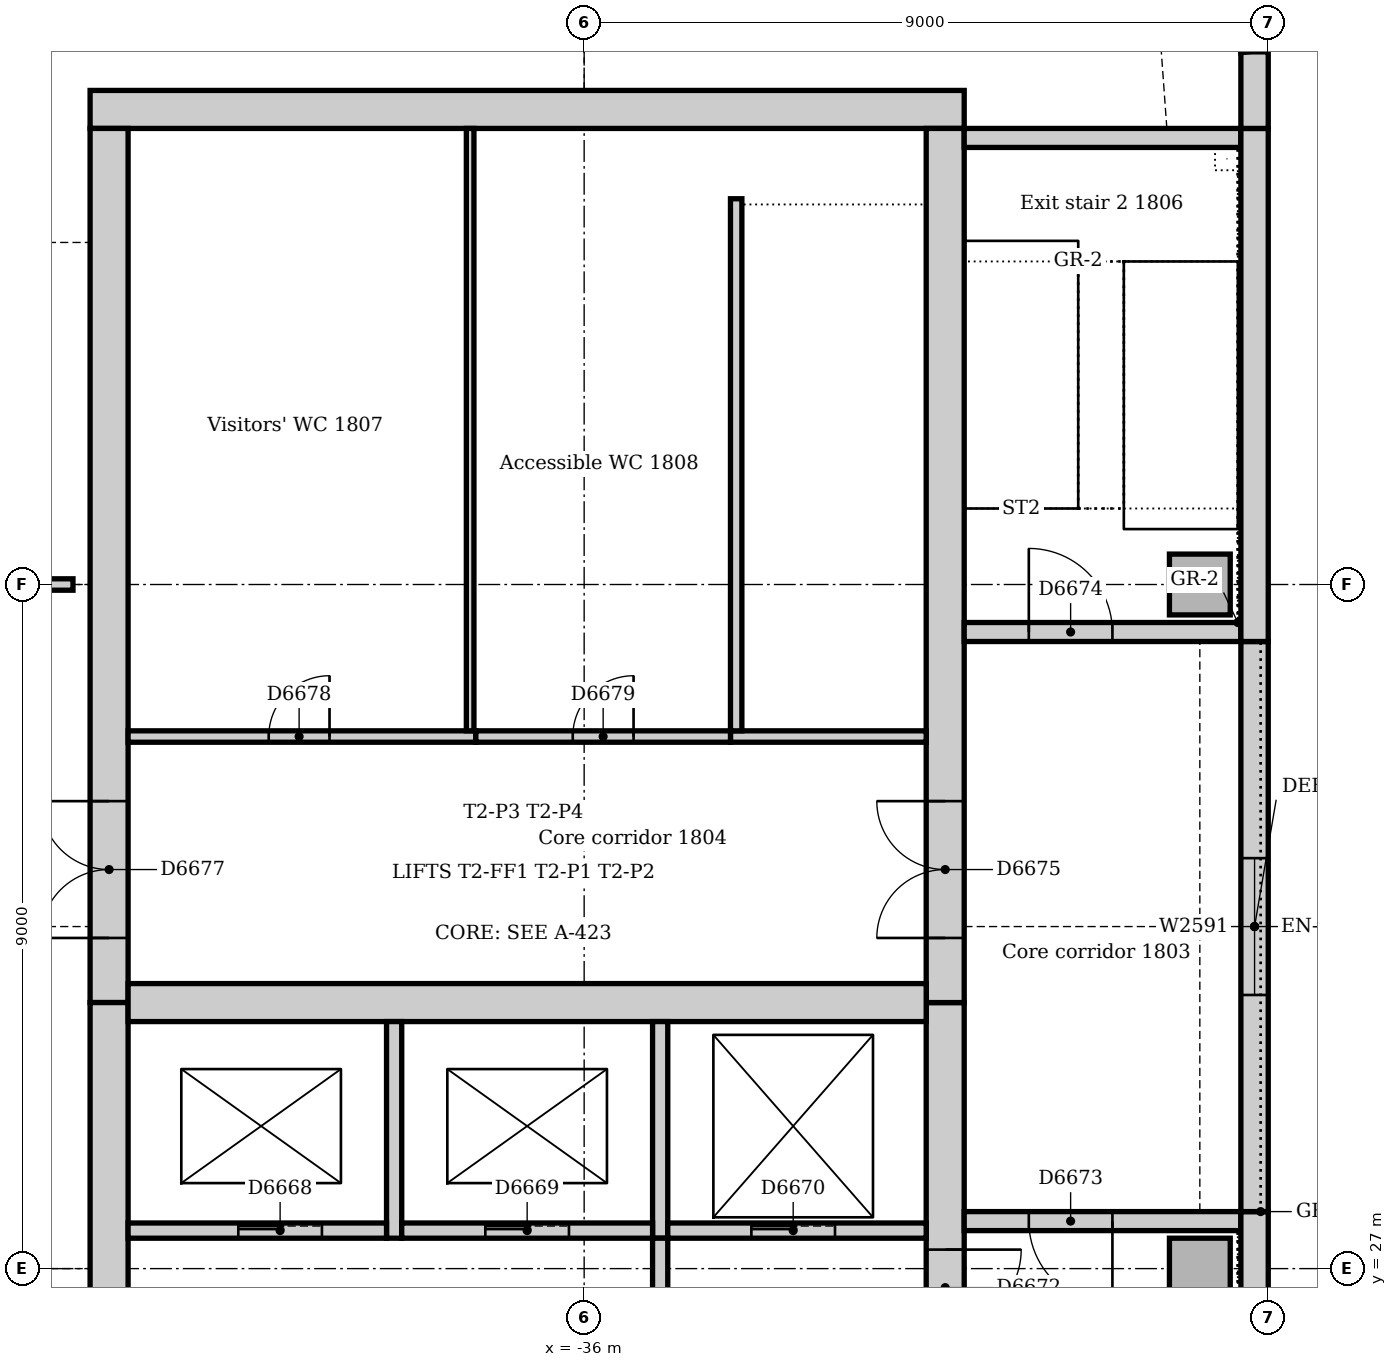
"""IFC4 building model, lengths in metres.
Left out: names, types, materials, properties, quantities, classifications, styles, units other than length and angle.
Written with IfcOpenShell. Run it as: python <this file> out.ifc"""

import sys

from ifc_helpers import new_model, si_unit, direction, frame, frame_2d, origin, origin_2d, place, context, subcontext, project, spatial, rectangle, extrude, element, fill, save


model = new_model("IFC4")
c1 = context("Model", 3, precision=1e-05, world=origin(), true_north=direction((0.0, 1.0)))
c2 = subcontext(c1, "Body", "Model", "MODEL_VIEW")
j1 = project(units=[si_unit("LENGTHUNIT", "METRE"), si_unit("PLANEANGLEUNIT", "RADIAN")], contexts=[c1])
p1 = place(None, origin())
s1 = spatial("IfcSite", under=j1, at=p1, CompositionType="ELEMENT")
p2 = place(p1, origin())
s2 = spatial("IfcBuilding", under=s1, at=p2, CompositionType="ELEMENT")
p3 = place(p2, frame((0.0, 0.0, 79.0)))
s3 = spatial("IfcBuildingStorey", under=s2, at=p3, CompositionType="ELEMENT", Elevation=79.0)
p4 = place(p3, frame((-31.0, 42.25, 0.0), z_axis=(0.0, 0.0, 1.0), x_axis=(-1.0, 0.0, 0.0)))
e1 = element("IfcWall", 1, at=p4, inside=s3, PredefinedType="SOLIDWALL", context=c2, shape_type="SweptSolid", body=[
    extrude(rectangle(XDim=11.5, YDim=0.5, at=frame_2d((5.75, 0.0))), origin(), (0.0, 0.0, 1.0), 4.0),
])
p5 = place(p3, frame((-31.25, 21.0, 0.0), z_axis=(0.0, 0.0, 1.0), x_axis=(0.0, 1.0, 0.0)))
e2 = element("IfcWall", 2, at=p5, inside=s3, PredefinedType="SOLIDWALL", context=c2, shape_type="SweptSolid", body=[
    extrude(rectangle(XDim=9.5, YDim=0.5, at=frame_2d((4.75, 0.0))), origin(), (0.0, 0.0, 1.0), 4.0),
])
p6 = place(p5, frame((5.25, 0.0, 0.0)))
e3 = element("IfcOpeningElement", 3, at=p6, cuts=e2, PredefinedType="OPENING", context=c2, shape_type="SweptSolid", body=[
    extrude(rectangle(XDim=1.0, YDim=2.1, at=frame_2d((0.5, 1.05))), frame((0.0, 0.26, 0.0), z_axis=(0.0, -1.0, 0.0), x_axis=(1.0, 0.0, 0.0)), (0.0, 0.0, 1.0), 0.52),
])
p7 = place(p3, frame((-31.25, 30.5, 0.0), z_axis=(0.0, 0.0, 1.0), x_axis=(0.0, 1.0, 0.0)))
e4 = element("IfcWall", 4, at=p7, inside=s3, PredefinedType="SOLIDWALL", context=c2, shape_type="SweptSolid", body=[
    extrude(rectangle(XDim=11.5, YDim=0.5, at=frame_2d((5.75, 0.0))), origin(), (0.0, 0.0, 1.0), 4.0),
])
p8 = place(p7, frame((0.85, 0.0, 0.0)))
e5 = element("IfcOpeningElement", 5, at=p8, cuts=e4, PredefinedType="OPENING", context=c2, shape_type="SweptSolid", body=[
    extrude(rectangle(XDim=1.8, YDim=2.1, at=frame_2d((0.9, 1.05))), frame((0.0, 0.26, 0.0), z_axis=(0.0, -1.0, 0.0), x_axis=(1.0, 0.0, 0.0)), (0.0, 0.0, 1.0), 0.52),
])
p9 = place(p3, frame((-42.25, 42.0, 0.0), z_axis=(0.0, 0.0, 1.0), x_axis=(0.0, -1.0, 0.0)))
e6 = element("IfcWall", 6, at=p9, inside=s3, PredefinedType="SOLIDWALL", context=c2, shape_type="SweptSolid", body=[
    extrude(rectangle(XDim=11.5, YDim=0.5, at=frame_2d((5.75, 0.0))), origin(), (0.0, 0.0, 1.0), 4.0),
])
p10 = place(p9, frame((8.85, 0.0, 0.0)))
e7 = element("IfcOpeningElement", 7, at=p10, cuts=e6, PredefinedType="OPENING", context=c2, shape_type="SweptSolid", body=[
    extrude(rectangle(XDim=1.8, YDim=2.1, at=frame_2d((0.9, 1.05))), frame((0.0, 0.26, 0.0), z_axis=(0.0, -1.0, 0.0), x_axis=(1.0, 0.0, 0.0)), (0.0, 0.0, 1.0), 0.52),
])
p11 = place(p3, frame((-42.25, 30.5, 0.0), z_axis=(0.0, 0.0, 1.0), x_axis=(0.0, -1.0, 0.0)))
e8 = element("IfcWall", 8, at=p11, inside=s3, PredefinedType="SOLIDWALL", context=c2, shape_type="SweptSolid", body=[
    extrude(rectangle(XDim=9.5, YDim=0.5, at=frame_2d((4.75, 0.0))), origin(), (0.0, 0.0, 1.0), 4.0),
])
p12 = place(p11, frame((3.85, 0.0, 0.0)))
e9 = element("IfcOpeningElement", 9, at=p12, cuts=e8, PredefinedType="OPENING", context=c2, shape_type="SweptSolid", body=[
    extrude(rectangle(XDim=1.8, YDim=2.1, at=frame_2d((0.9, 1.05))), frame((0.0, 0.26, 0.0), z_axis=(0.0, -1.0, 0.0), x_axis=(1.0, 0.0, 0.0)), (0.0, 0.0, 1.0), 0.52),
])
p13 = place(p3, frame((-42.0, 30.5, 0.0), z_axis=(0.0, 0.0, 1.0), x_axis=(1.0, 0.0, 0.0)))
e10 = element("IfcWall", 10, at=p13, inside=s3, PredefinedType="SOLIDWALL", context=c2, shape_type="SweptSolid", body=[
    extrude(rectangle(XDim=10.5, YDim=0.5, at=frame_2d((5.25, 0.0))), origin(), (0.0, 0.0, 1.0), 4.0),
])
p14 = place(p3, frame((-27.36, 27.625, 0.0), z_axis=(0.0, 0.0, 1.0), x_axis=(-1.0, 0.0, 0.0)))
e11 = element("IfcWall", 11, at=p14, inside=s3, PredefinedType="SOLIDWALL", context=c2, shape_type="SweptSolid", body=[
    extrude(rectangle(XDim=3.64, YDim=0.25, at=frame_2d((1.82, 0.0))), origin(), (0.0, 0.0, 1.0), 4.0),
])
p15 = place(p14, frame((1.69, 0.0, 0.0)))
e12 = element("IfcOpeningElement", 12, at=p15, cuts=e11, PredefinedType="OPENING", context=c2, shape_type="SweptSolid", body=[
    extrude(rectangle(XDim=1.1, YDim=2.1, at=frame_2d((0.55, 1.05))), frame((0.0, 0.135, 0.0), z_axis=(0.0, -1.0, 0.0), x_axis=(1.0, 0.0, 0.0)), (0.0, 0.0, 1.0), 0.27),
])
p16 = place(p3, frame((-31.0, 35.375, 0.0), z_axis=(0.0, 0.0, 1.0), x_axis=(1.0, 0.0, 0.0)))
e13 = element("IfcWall", 13, at=p16, inside=s3, PredefinedType="SOLIDWALL", context=c2, shape_type="SweptSolid", body=[
    extrude(rectangle(XDim=3.64, YDim=0.25, at=frame_2d((1.82, 0.0))), origin(), (0.0, 0.0, 1.0), 4.0),
])
p17 = place(p16, frame((0.85, 0.0, 0.0)))
e14 = element("IfcOpeningElement", 14, at=p17, cuts=e13, PredefinedType="OPENING", context=c2, shape_type="SweptSolid", body=[
    extrude(rectangle(XDim=1.1, YDim=2.1, at=frame_2d((0.55, 1.05))), frame((0.0, 0.135, 0.0), z_axis=(0.0, -1.0, 0.0), x_axis=(1.0, 0.0, 0.0)), (0.0, 0.0, 1.0), 0.27),
])
p18 = place(p3, frame((-27.36, 41.875, 0.0), z_axis=(0.0, 0.0, 1.0), x_axis=(-1.0, 0.0, 0.0)))
e15 = element("IfcWall", 15, at=p18, inside=s3, PredefinedType="SOLIDWALL", context=c2, shape_type="SweptSolid", body=[
    extrude(rectangle(XDim=3.64, YDim=0.25, at=frame_2d((1.82, 0.0))), origin(), (0.0, 0.0, 1.0), 4.0),
])
for number, where, z_axis, x_axis in (
    (16, (-27.9, 27.0, 0.0), (0.0, 0.0, 1.0), (1.0, 0.0, 0.0)),
    (17, (-27.9, 36.0, 0.0), (0.0, 0.0, 1.0), (1.0, 0.0, 0.0)),
):
    element("IfcColumn", number, at=place(p3, frame(where, z_axis=z_axis, x_axis=x_axis)), inside=s3, PredefinedType="COLUMN", context=c2, shape_type="SweptSolid", body=[
        extrude(rectangle(XDim=0.8, YDim=0.8, at=origin_2d()), origin(), (0.0, 0.0, 1.0), 4.0),
    ])
p19 = place(p3, frame((-27.18, 21.0, 0.0), z_axis=(0.0, 0.0, 1.0), x_axis=(0.0, 1.0, 0.0)))
e18 = element("IfcWall", 18, at=p19, inside=s3, PredefinedType="STANDARD", context=c2, shape_type="SweptSolid", body=[
    extrude(rectangle(XDim=6.75, YDim=0.36, at=frame_2d((3.375, 0.0))), origin(), (0.0, 0.0, 1.0), 3.85),
])
p20 = place(p3, frame((-27.18, 27.75, 0.0), z_axis=(0.0, 0.0, 1.0), x_axis=(0.0, 1.0, 0.0)))
e19 = element("IfcWall", 19, at=p20, inside=s3, PredefinedType="STANDARD", context=c2, shape_type="SweptSolid", body=[
    extrude(rectangle(XDim=7.5, YDim=0.36, at=frame_2d((3.75, 0.0))), origin(), (0.0, 0.0, 1.0), 3.85),
])
p21 = place(p20, frame((2.85, 0.0, 1.2)))
e20 = element("IfcOpeningElement", 20, at=p21, cuts=e19, PredefinedType="OPENING", context=c2, shape_type="SweptSolid", body=[
    extrude(rectangle(XDim=1.8, YDim=1.2, at=frame_2d((0.9, 0.6))), frame((0.0, 0.19, 0.0), z_axis=(0.0, -1.0, 0.0), x_axis=(1.0, 0.0, 0.0)), (0.0, 0.0, 1.0), 0.38),
])
p22 = place(p3, frame((-27.18, 35.25, 0.0), z_axis=(0.0, 0.0, 1.0), x_axis=(0.0, 1.0, 0.0)))
e21 = element("IfcWall", 21, at=p22, inside=s3, PredefinedType="STANDARD", context=c2, shape_type="SweptSolid", body=[
    extrude(rectangle(XDim=6.75, YDim=0.36, at=frame_2d((3.375, 0.0))), origin(), (0.0, 0.0, 1.0), 3.85),
])
p23 = place(p3, frame((-27.18, 42.0, 0.0), z_axis=(0.0, 0.0, 1.0), x_axis=(0.0, 1.0, 0.0)))
e22 = element("IfcWall", 22, at=p23, inside=s3, PredefinedType="STANDARD", context=c2, shape_type="SweptSolid", body=[
    extrude(rectangle(XDim=1.007, YDim=0.36, at=frame_2d((0.504, 0.0))), origin(), (0.0, 0.0, 1.0), 3.85),
])
p24 = place(p3, frame((-27.183, 43.019, 0.0), z_axis=(0.0, 0.0, 1.0), x_axis=(-0.13055608231, 0.99144092581, 0.0)))
e23 = element("IfcWall", 23, at=p24, inside=s3, PredefinedType="STANDARD", context=c2, shape_type="SweptSolid", body=[
    extrude(rectangle(XDim=0.713, YDim=0.36, at=frame_2d((0.356, 0.0))), origin(), (0.0, 0.0, 1.0), 3.85),
])
p25 = place(p3, frame((-38.5, 27.4, 0.0), z_axis=(0.0, 0.0, 1.0), x_axis=(0.0, 1.0, 0.0)))
e24 = element("IfcWall", 24, at=p25, inside=s3, PredefinedType="SOLIDWALL", context=c2, shape_type="SweptSolid", body=[
    extrude(rectangle(XDim=2.85, YDim=0.2, at=frame_2d((1.425, 0.0))), origin(), (0.0, 0.0, 1.0), 4.0),
])
p26 = place(p3, frame((-42.0, 27.5, 0.0), z_axis=(0.0, 0.0, 1.0), x_axis=(1.0, 0.0, 0.0)))
e25 = element("IfcWall", 25, at=p26, inside=s3, PredefinedType="SOLIDWALL", context=c2, shape_type="SweptSolid", body=[
    extrude(rectangle(XDim=3.4, YDim=0.2, at=frame_2d((1.7, 0.0))), origin(), (0.0, 0.0, 1.0), 4.0),
])
p27 = place(p26, frame((1.45, 0.0, 0.0)))
e26 = element("IfcOpeningElement", 26, at=p27, cuts=e25, PredefinedType="OPENING", context=c2, shape_type="SweptSolid", body=[
    extrude(rectangle(XDim=1.1, YDim=2.1, at=frame_2d((0.55, 1.05))), frame((0.0, 0.11, 0.0), z_axis=(0.0, -1.0, 0.0), x_axis=(1.0, 0.0, 0.0)), (0.0, 0.0, 1.0), 0.22),
])
p28 = place(p3, frame((-35.0, 27.4, 0.0), z_axis=(0.0, 0.0, 1.0), x_axis=(0.0, 1.0, 0.0)))
e27 = element("IfcWall", 27, at=p28, inside=s3, PredefinedType="SOLIDWALL", context=c2, shape_type="SweptSolid", body=[
    extrude(rectangle(XDim=2.85, YDim=0.2, at=frame_2d((1.425, 0.0))), origin(), (0.0, 0.0, 1.0), 4.0),
])
p29 = place(p3, frame((-38.4, 27.5, 0.0), z_axis=(0.0, 0.0, 1.0), x_axis=(1.0, 0.0, 0.0)))
e28 = element("IfcWall", 28, at=p29, inside=s3, PredefinedType="SOLIDWALL", context=c2, shape_type="SweptSolid", body=[
    extrude(rectangle(XDim=3.3, YDim=0.2, at=frame_2d((1.65, 0.0))), origin(), (0.0, 0.0, 1.0), 4.0),
])
p30 = place(p29, frame((1.1, 0.0, 0.0)))
e29 = element("IfcOpeningElement", 29, at=p30, cuts=e28, PredefinedType="OPENING", context=c2, shape_type="SweptSolid", body=[
    extrude(rectangle(XDim=1.1, YDim=2.1, at=frame_2d((0.55, 1.05))), frame((0.0, 0.11, 0.0), z_axis=(0.0, -1.0, 0.0), x_axis=(1.0, 0.0, 0.0)), (0.0, 0.0, 1.0), 0.22),
])
p31 = place(p3, frame((-34.9, 27.5, 0.0), z_axis=(0.0, 0.0, 1.0), x_axis=(1.0, 0.0, 0.0)))
e30 = element("IfcWall", 30, at=p31, inside=s3, PredefinedType="SOLIDWALL", context=c2, shape_type="SweptSolid", body=[
    extrude(rectangle(XDim=3.4, YDim=0.2, at=frame_2d((1.7, 0.0))), origin(), (0.0, 0.0, 1.0), 4.0),
])
p32 = place(p31, frame((1.1, 0.0, 0.0)))
e31 = element("IfcOpeningElement", 31, at=p32, cuts=e30, PredefinedType="OPENING", context=c2, shape_type="SweptSolid", body=[
    extrude(rectangle(XDim=1.1, YDim=2.1, at=frame_2d((0.55, 1.05))), frame((0.0, 0.11, 0.0), z_axis=(0.0, -1.0, 0.0), x_axis=(1.0, 0.0, 0.0)), (0.0, 0.0, 1.0), 0.22),
])
p33 = place(p3, frame((-35.0, 24.1, 0.0), z_axis=(0.0, 0.0, 1.0), x_axis=(0.0, 1.0, 0.0)))
e32 = element("IfcWall", 32, at=p33, inside=s3, PredefinedType="SOLIDWALL", context=c2, shape_type="SweptSolid", body=[
    extrude(rectangle(XDim=3.3, YDim=0.2, at=frame_2d((1.65, 0.0))), origin(), (0.0, 0.0, 1.0), 4.0),
])
p34 = place(p33, frame((1.15, 0.0, 0.0)))
e33 = element("IfcOpeningElement", 33, at=p34, cuts=e32, PredefinedType="OPENING", context=c2, shape_type="SweptSolid", body=[
    extrude(rectangle(XDim=1.0, YDim=2.1, at=frame_2d((0.5, 1.05))), frame((0.0, 0.11, 0.0), z_axis=(0.0, -1.0, 0.0), x_axis=(1.0, 0.0, 0.0)), (0.0, 0.0, 1.0), 0.22),
])
p35 = place(p3, frame((-34.075, 34.0, 0.0), z_axis=(0.0, 0.0, 1.0), x_axis=(1.0, 0.0, 0.0)))
e34 = element("IfcWall", 34, at=p35, inside=s3, PredefinedType="SOLIDWALL", context=c2, shape_type="SweptSolid", body=[
    extrude(rectangle(XDim=2.575, YDim=0.15, at=frame_2d((1.288, 0.0))), origin(), (0.0, 0.0, 1.0), 4.0),
])
p36 = place(p3, frame((-34.0, 41.075, 0.0), z_axis=(0.0, 0.0, 1.0), x_axis=(0.0, -1.0, 0.0)))
e35 = element("IfcWall", 35, at=p36, inside=s3, PredefinedType="SOLIDWALL", context=c2, shape_type="SweptSolid", body=[
    extrude(rectangle(XDim=7.0, YDim=0.15, at=frame_2d((3.5, 0.0))), origin(), (0.0, 0.0, 1.0), 4.0),
])
p37 = place(p3, frame((-37.425, 34.0, 0.0), z_axis=(0.0, 0.0, 1.0), x_axis=(-1.0, 0.0, 0.0)))
e36 = element("IfcWall", 36, at=p37, inside=s3, PredefinedType="PARTITIONING", context=c2, shape_type="SweptSolid", body=[
    extrude(rectangle(XDim=4.575, YDim=0.15, at=frame_2d((2.288, 0.0))), origin(), (0.0, 0.0, 1.0), 3.85),
])
p38 = place(p37, frame((1.925, 0.0, 0.0)))
e37 = element("IfcOpeningElement", 37, at=p38, cuts=e36, PredefinedType="OPENING", context=c2, shape_type="SweptSolid", body=[
    extrude(rectangle(XDim=0.8, YDim=2.1, at=frame_2d((0.4, 1.05))), frame((0.0, 0.085, 0.0), z_axis=(0.0, -1.0, 0.0), x_axis=(1.0, 0.0, 0.0)), (0.0, 0.0, 1.0), 0.17),
])
p39 = place(p3, frame((-34.075, 34.0, 0.0), z_axis=(0.0, 0.0, 1.0), x_axis=(-1.0, 0.0, 0.0)))
e38 = element("IfcWall", 38, at=p39, inside=s3, PredefinedType="PARTITIONING", context=c2, shape_type="SweptSolid", body=[
    extrude(rectangle(XDim=3.35, YDim=0.15, at=frame_2d((1.675, 0.0))), origin(), (0.0, 0.0, 1.0), 3.85),
])
p40 = place(p39, frame((1.275, 0.0, 0.0)))
e39 = element("IfcOpeningElement", 39, at=p40, cuts=e38, PredefinedType="OPENING", context=c2, shape_type="SweptSolid", body=[
    extrude(rectangle(XDim=0.8, YDim=2.1, at=frame_2d((0.4, 1.05))), frame((0.0, 0.085, 0.0), z_axis=(0.0, -1.0, 0.0), x_axis=(1.0, 0.0, 0.0)), (0.0, 0.0, 1.0), 0.17),
])
p41 = place(p3, frame((-37.5, 34.075, 0.0), z_axis=(0.0, 0.0, 1.0), x_axis=(0.0, 1.0, 0.0)))
e40 = element("IfcWall", 40, at=p41, inside=s3, PredefinedType="PARTITIONING", context=c2, shape_type="SweptSolid", body=[
    extrude(rectangle(XDim=7.925, YDim=0.1, at=frame_2d((3.962, 0.0))), origin(), (0.0, 0.0, 1.0), 3.85),
])
p42 = place(p3, frame((-44.65, 36.0, 0.0), z_axis=(0.0, 0.0, 1.0), x_axis=(1.0, 0.0, 0.0)))
e41 = element("IfcWall", 41, at=p42, inside=s3, PredefinedType="PARTITIONING", context=c2, shape_type="SweptSolid", body=[
    extrude(rectangle(XDim=1.925, YDim=0.15, at=frame_2d((0.963, 0.0))), origin(), (0.0, 0.0, 1.0), 3.602),
])
p43 = place(p42, frame((0.5, 0.0, 0.0)))
e42 = element("IfcOpeningElement", 42, at=p43, cuts=e41, PredefinedType="OPENING", context=c2, shape_type="SweptSolid", body=[
    extrude(rectangle(XDim=0.9, YDim=2.1, at=frame_2d((0.45, 1.05))), frame((0.0, 0.085, 0.0), z_axis=(0.0, -1.0, 0.0), x_axis=(1.0, 0.0, 0.0)), (0.0, 0.0, 1.0), 0.17),
])
p44 = place(p21, origin())
e43 = element("IfcWindow", 43, at=p44, inside=s3, PartitioningType="SINGLE_PANEL", PredefinedType="WINDOW", context=c2, shape_type="SweptSolid", body=[
    extrude(rectangle(XDim=1.8, YDim=1.2, at=frame_2d((0.9, 0.6))), frame((0.0, 0.13, 0.0), z_axis=(0.0, -1.0, 0.0), x_axis=(1.0, 0.0, 0.0)), (0.0, 0.0, 1.0), 0.06),
])
fill(e20, e43)
p45 = place(p27, origin())
e44 = element("IfcDoor", 44, at=p45, inside=s3, OperationType="SLIDING_TO_LEFT", PredefinedType="DOOR", context=c2, shape_type="SweptSolid", body=[
    extrude(rectangle(XDim=1.1, YDim=2.1, at=frame_2d((0.55, 1.05))), frame((0.0, 0.025, 0.0), z_axis=(0.0, -1.0, 0.0), x_axis=(1.0, 0.0, 0.0)), (0.0, 0.0, 1.0), 0.05),
])
fill(e26, e44)
p46 = place(p30, origin())
e45 = element("IfcDoor", 45, at=p46, inside=s3, OperationType="SLIDING_TO_LEFT", PredefinedType="DOOR", context=c2, shape_type="SweptSolid", body=[
    extrude(rectangle(XDim=1.1, YDim=2.1, at=frame_2d((0.55, 1.05))), frame((0.0, 0.025, 0.0), z_axis=(0.0, -1.0, 0.0), x_axis=(1.0, 0.0, 0.0)), (0.0, 0.0, 1.0), 0.05),
])
fill(e29, e45)
p47 = place(p32, origin())
e46 = element("IfcDoor", 46, at=p47, inside=s3, OperationType="SLIDING_TO_LEFT", PredefinedType="DOOR", context=c2, shape_type="SweptSolid", body=[
    extrude(rectangle(XDim=1.1, YDim=2.1, at=frame_2d((0.55, 1.05))), frame((0.0, 0.025, 0.0), z_axis=(0.0, -1.0, 0.0), x_axis=(1.0, 0.0, 0.0)), (0.0, 0.0, 1.0), 0.05),
])
fill(e31, e46)
p48 = place(p6, frame((1.0, 0.0, 0.0), z_axis=(0.0, 0.0, 1.0), x_axis=(-1.0, 0.0, 0.0)))
e47 = element("IfcDoor", 47, at=p48, inside=s3, OperationType="SINGLE_SWING_LEFT", PredefinedType="DOOR", context=c2, shape_type="SweptSolid", body=[
    extrude(rectangle(XDim=1.0, YDim=2.1, at=frame_2d((0.5, 1.05))), frame((0.0, 0.025, 0.0), z_axis=(0.0, -1.0, 0.0), x_axis=(1.0, 0.0, 0.0)), (0.0, 0.0, 1.0), 0.05),
])
fill(e3, e47)
p49 = place(p15, origin())
e48 = element("IfcDoor", 48, at=p49, inside=s3, OperationType="SINGLE_SWING_LEFT", PredefinedType="DOOR", context=c2, shape_type="SweptSolid", body=[
    extrude(rectangle(XDim=1.1, YDim=2.1, at=frame_2d((0.55, 1.05))), frame((0.0, 0.025, 0.0), z_axis=(0.0, -1.0, 0.0), x_axis=(1.0, 0.0, 0.0)), (0.0, 0.0, 1.0), 0.05),
])
fill(e12, e48)
p50 = place(p17, origin())
e49 = element("IfcDoor", 49, at=p50, inside=s3, OperationType="SINGLE_SWING_LEFT", PredefinedType="DOOR", context=c2, shape_type="SweptSolid", body=[
    extrude(rectangle(XDim=1.1, YDim=2.1, at=frame_2d((0.55, 1.05))), frame((0.0, 0.025, 0.0), z_axis=(0.0, -1.0, 0.0), x_axis=(1.0, 0.0, 0.0)), (0.0, 0.0, 1.0), 0.05),
])
fill(e14, e49)
p51 = place(p8, origin())
e50 = element("IfcDoor", 50, at=p51, inside=s3, OperationType="DOUBLE_DOOR_SINGLE_SWING", PredefinedType="DOOR", context=c2, shape_type="SweptSolid", body=[
    extrude(rectangle(XDim=1.8, YDim=2.1, at=frame_2d((0.9, 1.05))), frame((0.0, 0.025, 0.0), z_axis=(0.0, -1.0, 0.0), x_axis=(1.0, 0.0, 0.0)), (0.0, 0.0, 1.0), 0.05),
])
fill(e5, e50)
p52 = place(p10, frame((1.8, 0.0, 0.0), z_axis=(0.0, 0.0, 1.0), x_axis=(-1.0, 0.0, 0.0)))
e51 = element("IfcDoor", 51, at=p52, inside=s3, OperationType="DOUBLE_DOOR_SINGLE_SWING", PredefinedType="DOOR", context=c2, shape_type="SweptSolid", body=[
    extrude(rectangle(XDim=1.8, YDim=2.1, at=frame_2d((0.9, 1.05))), frame((0.0, 0.025, 0.0), z_axis=(0.0, -1.0, 0.0), x_axis=(1.0, 0.0, 0.0)), (0.0, 0.0, 1.0), 0.05),
])
fill(e7, e51)
p53 = place(p38, frame((0.8, 0.0, 0.0), z_axis=(0.0, 0.0, 1.0), x_axis=(-1.0, 0.0, 0.0)))
e52 = element("IfcDoor", 52, at=p53, inside=s3, OperationType="SINGLE_SWING_RIGHT", PredefinedType="DOOR", context=c2, shape_type="SweptSolid", body=[
    extrude(rectangle(XDim=0.8, YDim=2.1, at=frame_2d((0.4, 1.05))), frame((0.0, 0.025, 0.0), z_axis=(0.0, -1.0, 0.0), x_axis=(1.0, 0.0, 0.0)), (0.0, 0.0, 1.0), 0.05),
])
fill(e37, e52)
p54 = place(p40, frame((0.8, 0.0, 0.0), z_axis=(0.0, 0.0, 1.0), x_axis=(-1.0, 0.0, 0.0)))
e53 = element("IfcDoor", 53, at=p54, inside=s3, OperationType="SINGLE_SWING_RIGHT", PredefinedType="DOOR", context=c2, shape_type="SweptSolid", body=[
    extrude(rectangle(XDim=0.8, YDim=2.1, at=frame_2d((0.4, 1.05))), frame((0.0, 0.025, 0.0), z_axis=(0.0, -1.0, 0.0), x_axis=(1.0, 0.0, 0.0)), (0.0, 0.0, 1.0), 0.05),
])
fill(e39, e53)
save(model, sys.argv[1])
